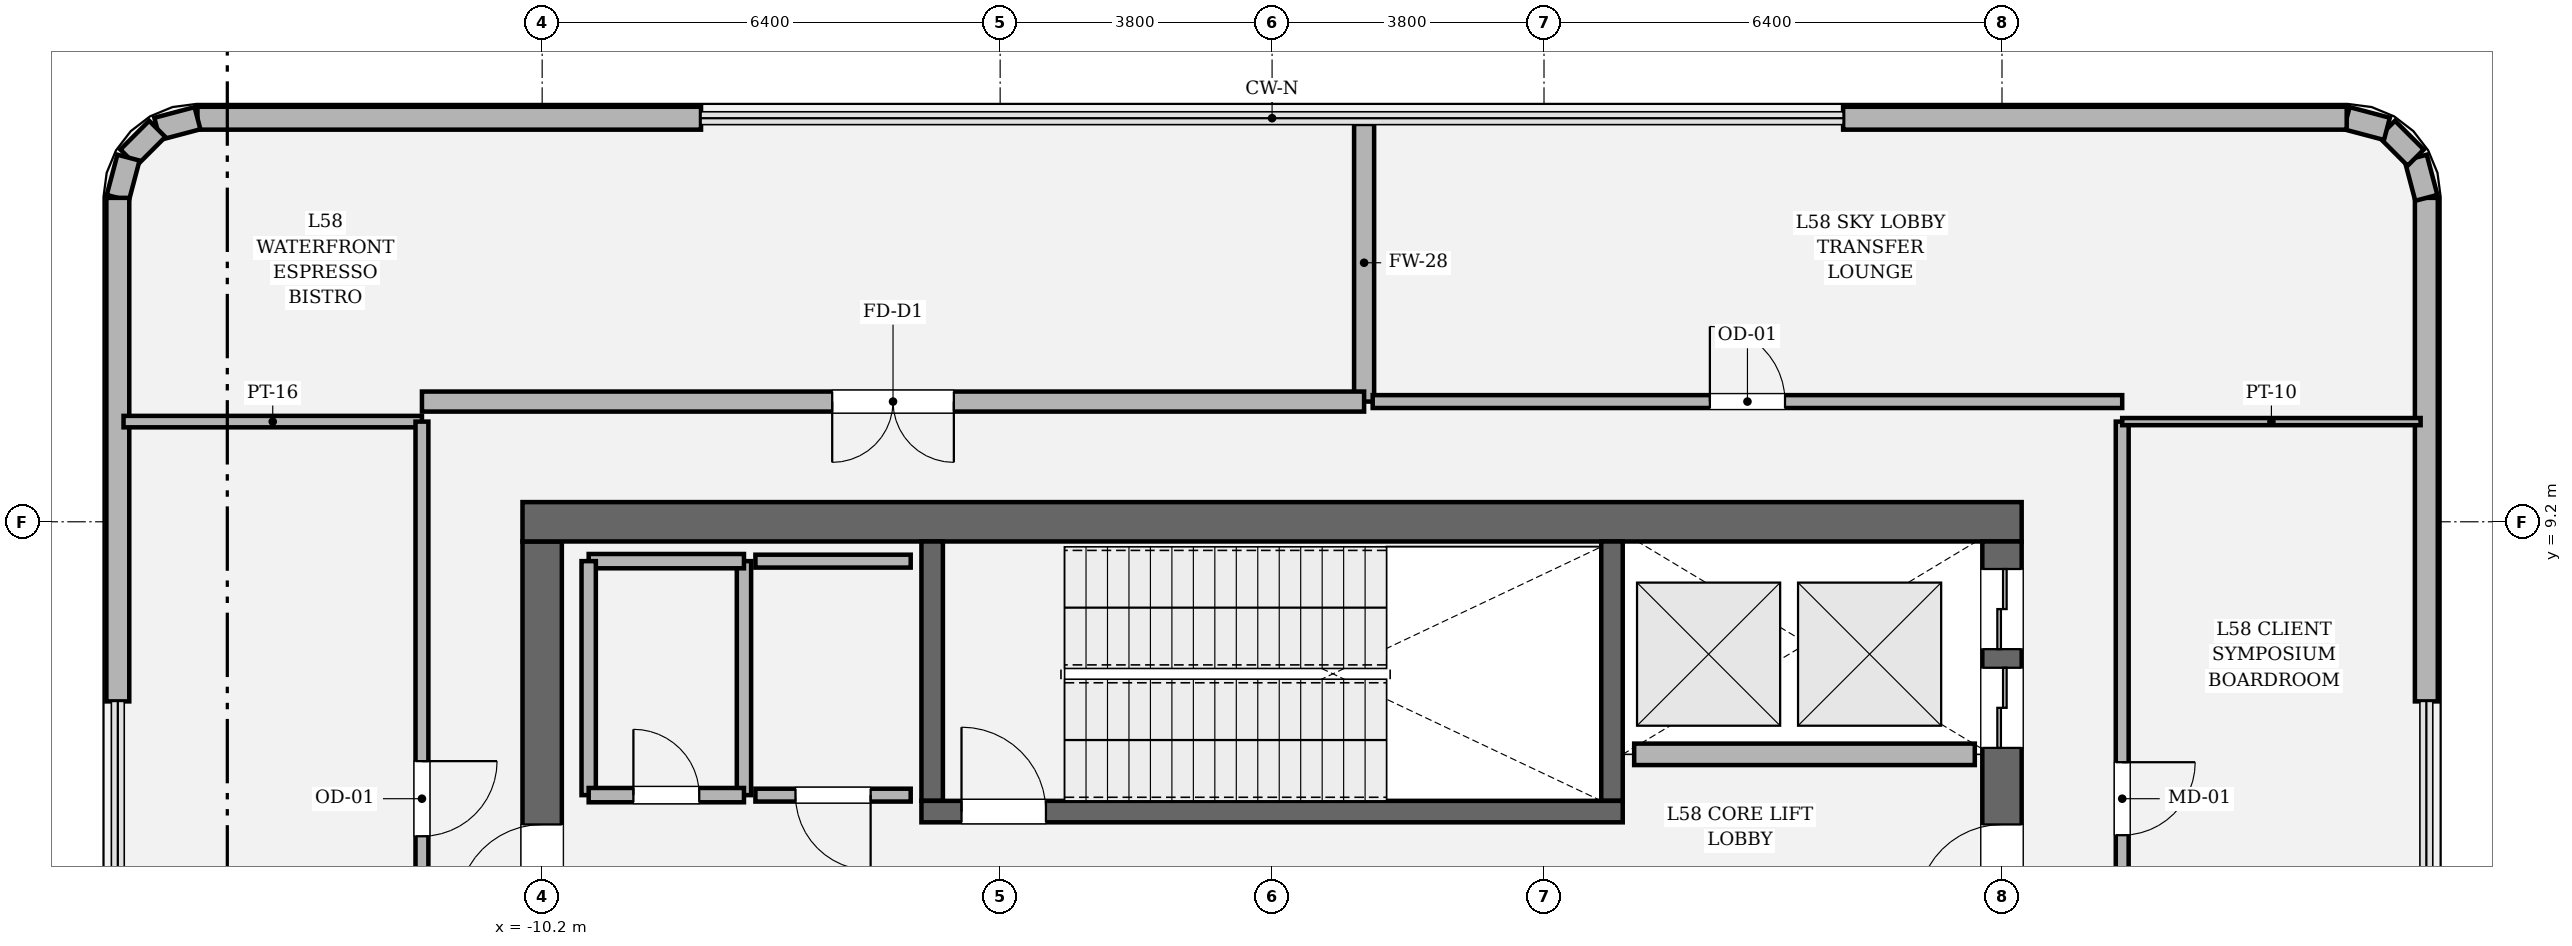
"""IFC4 building model, lengths in metres.
Left out: names, types, materials, properties, quantities, classifications, styles, units other than length and angle.
Written with IfcOpenShell. Run it as: python <this file> out.ifc"""

import sys

from ifc_helpers import new_model, si_unit, direction, frame, frame_2d, origin, place, context, subcontext, project, spatial, rectangle, extrude, element, fill, save


model = new_model("IFC4")
c1 = context("Model", 3, precision=1e-05, world=origin(), true_north=direction((0.0, 1.0)))
c2 = subcontext(c1, "Body", "Model", "MODEL_VIEW")
j1 = project(units=[si_unit("LENGTHUNIT", "METRE"), si_unit("PLANEANGLEUNIT", "RADIAN")], contexts=[c1])
p1 = place(None, origin())
s1 = spatial("IfcSite", under=j1, at=p1, CompositionType="ELEMENT")
p2 = place(p1, origin())
s2 = spatial("IfcBuilding", under=s1, at=p2, CompositionType="ELEMENT")
p3 = place(p2, frame((0.0, 0.0, 246.6)))
s3 = spatial("IfcBuildingStorey", under=s2, at=p3, CompositionType="ELEMENT", Elevation=246.6)
p4 = place(p3, frame((-10.2, -8.925, 0.0), z_axis=(0.0, 0.0, 1.0), x_axis=(0.0, 1.0, 0.0)))
e1 = element("IfcWall", 1, at=p4, inside=s3, PredefinedType="SHEAR", context=c2, shape_type="SweptSolid", body=[
    extrude(rectangle(XDim=17.85, YDim=0.55, at=frame_2d((8.925, 0.0))), origin(), (0.0, 0.0, 1.0), 4.8),
])
p5 = place(p4, frame((12.715, 0.0, 0.0)))
e2 = element("IfcOpeningElement", 2, at=p5, cuts=e1, PredefinedType="OPENING", context=c2, shape_type="SweptSolid", body=[
    extrude(rectangle(XDim=1.18, YDim=2.2, at=frame_2d((0.59, 1.1))), frame((0.0, 0.285, 0.0), z_axis=(0.0, -1.0, 0.0), x_axis=(1.0, 0.0, 0.0)), (0.0, 0.0, 1.0), 0.57),
])
p6 = place(p3, frame((-10.475, 9.2, 0.0), z_axis=(0.0, 0.0, 1.0), x_axis=(1.0, 0.0, 0.0)))
e3 = element("IfcWall", 3, at=p6, inside=s3, PredefinedType="SHEAR", context=c2, shape_type="SweptSolid", body=[
    extrude(rectangle(XDim=20.95, YDim=0.55, at=frame_2d((10.475, 0.0))), origin(), (0.0, 0.0, 1.0), 4.8),
])
p7 = place(p3, frame((10.2, 8.925, 0.0), z_axis=(0.0, 0.0, 1.0), x_axis=(0.0, -1.0, 0.0)))
e4 = element("IfcWall", 4, at=p7, inside=s3, PredefinedType="SHEAR", context=c2, shape_type="SweptSolid", body=[
    extrude(rectangle(XDim=17.85, YDim=0.55, at=frame_2d((8.925, 0.0))), origin(), (0.0, 0.0, 1.0), 4.8),
])
p8 = place(p7, frame((3.955, 0.0, 0.0)))
e5 = element("IfcOpeningElement", 5, at=p8, cuts=e4, PredefinedType="OPENING", context=c2, shape_type="SweptSolid", body=[
    extrude(rectangle(XDim=1.18, YDim=2.2, at=frame_2d((0.59, 1.1))), frame((0.0, 0.285, 0.0), z_axis=(0.0, -1.0, 0.0), x_axis=(1.0, 0.0, 0.0)), (0.0, 0.0, 1.0), 0.57),
])
p9 = place(p7, frame((1.765, 0.0, 0.0)))
e6 = element("IfcOpeningElement", 6, at=p9, cuts=e4, PredefinedType="OPENING", context=c2, shape_type="SweptSolid", body=[
    extrude(rectangle(XDim=1.12, YDim=2.25, at=frame_2d((0.56, 1.125))), frame((0.0, 0.285, 0.0), z_axis=(0.0, -1.0, 0.0), x_axis=(1.0, 0.0, 0.0)), (0.0, 0.0, 1.0), 0.57),
])
p10 = place(p7, frame((0.385, 0.0, 0.0)))
e7 = element("IfcOpeningElement", 7, at=p10, cuts=e4, PredefinedType="OPENING", context=c2, shape_type="SweptSolid", body=[
    extrude(rectangle(XDim=1.12, YDim=2.25, at=frame_2d((0.56, 1.125))), frame((0.0, 0.285, 0.0), z_axis=(0.0, -1.0, 0.0), x_axis=(1.0, 0.0, 0.0)), (0.0, 0.0, 1.0), 0.57),
])
for number, where, z_axis, x_axis in (
    (8, (-4.75, 5.3, 0.0), (0.0, 0.0, 1.0), (0.0, 1.0, 0.0)),
    (9, (4.75, 8.925, 0.0), (0.0, 0.0, 1.0), (0.0, -1.0, 0.0)),
):
    element("IfcWall", number, at=place(p3, frame(where, z_axis=z_axis, x_axis=x_axis)), inside=s3, PredefinedType="SOLIDWALL", context=c2, shape_type="SweptSolid", body=[
        extrude(rectangle(XDim=3.625, YDim=0.3, at=frame_2d((1.812, 0.0))), origin(), (0.0, 0.0, 1.0), 4.8),
    ])
p11 = place(p3, frame((-4.9, 5.15, 0.0), z_axis=(0.0, 0.0, 1.0), x_axis=(1.0, 0.0, 0.0)))
e10 = element("IfcWall", 10, at=p11, inside=s3, PredefinedType="SOLIDWALL", context=c2, shape_type="SweptSolid", body=[
    extrude(rectangle(XDim=9.8, YDim=0.3, at=frame_2d((4.9, 0.0))), origin(), (0.0, 0.0, 1.0), 4.8),
])
p12 = place(p11, frame((0.56, 0.0, 0.0)))
e11 = element("IfcOpeningElement", 11, at=p12, cuts=e10, PredefinedType="OPENING", context=c2, shape_type="SweptSolid", body=[
    extrude(rectangle(XDim=1.18, YDim=2.2, at=frame_2d((0.59, 1.1))), frame((0.0, 0.16, 0.0), z_axis=(0.0, -1.0, 0.0), x_axis=(1.0, 0.0, 0.0)), (0.0, 0.0, 1.0), 0.32),
])
p13 = place(p3, frame((16.13, 6.69, 0.0), z_axis=(0.0, 0.0, 1.0), x_axis=(0.0, 1.0, 0.0)))
e12 = element("IfcWall", 12, at=p13, inside=s3, PredefinedType="SOLIDWALL", context=c2, shape_type="SweptSolid", body=[
    extrude(rectangle(XDim=7.037, YDim=0.32, at=frame_2d((3.519, 0.0))), origin(), (0.0, 0.0, 1.0), 3.194),
])
p14 = place(p3, frame((16.13, 13.727, 0.0), z_axis=(0.0, 0.0, 1.0), x_axis=(-0.255650250031, 0.966769336325, 0.0)))
e13 = element("IfcWall", 13, at=p14, inside=s3, PredefinedType="SOLIDWALL", context=c2, shape_type="SweptSolid", body=[
    extrude(rectangle(XDim=0.582, YDim=0.32, at=frame_2d((0.291, 0.0))), origin(), (0.0, 0.0, 1.0), 4.52),
])
p15 = place(p3, frame((15.981, 14.289, 0.0), z_axis=(0.0, 0.0, 1.0), x_axis=(-0.707106781187, 0.707106781187, 0.0)))
e14 = element("IfcWall", 14, at=p15, inside=s3, PredefinedType="SOLIDWALL", context=c2, shape_type="SweptSolid", body=[
    extrude(rectangle(XDim=0.569, YDim=0.32, at=frame_2d((0.284, 0.0))), origin(), (0.0, 0.0, 1.0), 4.52),
])
p16 = place(p3, frame((15.579, 14.691, 0.0), z_axis=(0.0, 0.0, 1.0), x_axis=(-0.966665515501, 0.256042537758, 0.0)))
e15 = element("IfcWall", 15, at=p16, inside=s3, PredefinedType="SOLIDWALL", context=c2, shape_type="SweptSolid", body=[
    extrude(rectangle(XDim=0.582, YDim=0.32, at=frame_2d((0.291, 0.0))), origin(), (0.0, 0.0, 1.0), 4.52),
])
for number, where, z_axis, x_axis in (
    (16, (15.017, 14.84, 0.0), (0.0, 0.0, 1.0), (-1.0, 0.0, 0.0)),
    (17, (-7.98, 14.84, 0.0), (0.0, 0.0, 1.0), (-1.0, 0.0, 0.0)),
):
    element("IfcWall", number, at=place(p3, frame(where, z_axis=z_axis, x_axis=x_axis)), inside=s3, PredefinedType="SOLIDWALL", context=c2, shape_type="SweptSolid", body=[
        extrude(rectangle(XDim=7.037, YDim=0.32, at=frame_2d((3.519, 0.0))), origin(), (0.0, 0.0, 1.0), 3.194),
    ])
p17 = place(p3, frame((-15.017, 14.84, 0.0), z_axis=(0.0, 0.0, 1.0), x_axis=(-0.966665515501, -0.256042537758, 0.0)))
e18 = element("IfcWall", 18, at=p17, inside=s3, PredefinedType="SOLIDWALL", context=c2, shape_type="SweptSolid", body=[
    extrude(rectangle(XDim=0.582, YDim=0.32, at=frame_2d((0.291, 0.0))), origin(), (0.0, 0.0, 1.0), 4.52),
])
p18 = place(p3, frame((-15.579, 14.691, 0.0), z_axis=(0.0, 0.0, 1.0), x_axis=(-0.707106781187, -0.707106781187, 0.0)))
e19 = element("IfcWall", 19, at=p18, inside=s3, PredefinedType="SOLIDWALL", context=c2, shape_type="SweptSolid", body=[
    extrude(rectangle(XDim=0.569, YDim=0.32, at=frame_2d((0.284, 0.0))), origin(), (0.0, 0.0, 1.0), 4.52),
])
p19 = place(p3, frame((-15.981, 14.289, 0.0), z_axis=(0.0, 0.0, 1.0), x_axis=(-0.255650250031, -0.966769336325, 0.0)))
e20 = element("IfcWall", 20, at=p19, inside=s3, PredefinedType="SOLIDWALL", context=c2, shape_type="SweptSolid", body=[
    extrude(rectangle(XDim=0.582, YDim=0.32, at=frame_2d((0.291, 0.0))), origin(), (0.0, 0.0, 1.0), 4.52),
])
p20 = place(p3, frame((-16.13, 13.727, 0.0), z_axis=(0.0, 0.0, 1.0), x_axis=(0.0, -1.0, 0.0)))
e21 = element("IfcWall", 21, at=p20, inside=s3, PredefinedType="SOLIDWALL", context=c2, shape_type="SweptSolid", body=[
    extrude(rectangle(XDim=7.037, YDim=0.32, at=frame_2d((3.519, 0.0))), origin(), (0.0, 0.0, 1.0), 3.194),
])
p21 = place(p3, frame((5.06, 5.95, 0.0), z_axis=(0.0, 0.0, 1.0), x_axis=(1.0, 0.0, 0.0)))
e22 = element("IfcWall", 22, at=p21, inside=s3, PredefinedType="SOLIDWALL", context=c2, shape_type="SweptSolid", body=[
    extrude(rectangle(XDim=4.76, YDim=0.3, at=frame_2d((2.38, 0.0))), origin(), (0.0, 0.0, 1.0), 4.52),
])
p22 = place(p3, frame((-7.38, 5.38, 0.0), z_axis=(0.0, 0.0, 1.0), x_axis=(0.0, 1.0, 0.0)))
e23 = element("IfcWall", 23, at=p22, inside=s3, PredefinedType="SOLIDWALL", context=c2, shape_type="SweptSolid", body=[
    extrude(rectangle(XDim=3.27, YDim=0.2, at=frame_2d((1.635, 0.0))), origin(), (0.0, 0.0, 1.0), 4.52),
])
p23 = place(p3, frame((-7.38, 8.65, 0.0), z_axis=(0.0, 0.0, 1.0), x_axis=(-1.0, 0.0, 0.0)))
e24 = element("IfcWall", 24, at=p23, inside=s3, PredefinedType="SOLIDWALL", context=c2, shape_type="SweptSolid", body=[
    extrude(rectangle(XDim=2.17, YDim=0.2, at=frame_2d((1.085, 0.0))), origin(), (0.0, 0.0, 1.0), 4.52),
])
p24 = place(p3, frame((-9.55, 8.65, 0.0), z_axis=(0.0, 0.0, 1.0), x_axis=(0.0, -1.0, 0.0)))
e25 = element("IfcWall", 25, at=p24, inside=s3, PredefinedType="SOLIDWALL", context=c2, shape_type="SweptSolid", body=[
    extrude(rectangle(XDim=3.27, YDim=0.2, at=frame_2d((1.635, 0.0))), origin(), (0.0, 0.0, 1.0), 4.52),
])
p25 = place(p3, frame((-9.55, 5.38, 0.0), z_axis=(0.0, 0.0, 1.0), x_axis=(1.0, 0.0, 0.0)))
e26 = element("IfcWall", 26, at=p25, inside=s3, PredefinedType="SOLIDWALL", context=c2, shape_type="SweptSolid", body=[
    extrude(rectangle(XDim=2.17, YDim=0.2, at=frame_2d((1.085, 0.0))), origin(), (0.0, 0.0, 1.0), 4.52),
])
p26 = place(p25, frame((0.625, 0.0, 0.0)))
e27 = element("IfcOpeningElement", 27, at=p26, cuts=e26, PredefinedType="OPENING", context=c2, shape_type="SweptSolid", body=[
    extrude(rectangle(XDim=0.92, YDim=2.1, at=frame_2d((0.46, 1.05))), frame((0.0, 0.11, 0.0), z_axis=(0.0, -1.0, 0.0), x_axis=(1.0, 0.0, 0.0)), (0.0, 0.0, 1.0), 0.22),
])
p27 = place(p3, frame((-5.05, 8.65, 0.0), z_axis=(0.0, 0.0, 1.0), x_axis=(-1.0, 0.0, 0.0)))
e28 = element("IfcWall", 28, at=p27, inside=s3, PredefinedType="PARTITIONING", context=c2, shape_type="SweptSolid", body=[
    extrude(rectangle(XDim=2.17, YDim=0.18, at=frame_2d((1.085, 0.0))), origin(), (0.0, 0.0, 1.0), 4.52),
])
p28 = place(p3, frame((-7.22, 5.38, 0.0), z_axis=(0.0, 0.0, 1.0), x_axis=(1.0, 0.0, 0.0)))
e29 = element("IfcWall", 29, at=p28, inside=s3, PredefinedType="PARTITIONING", context=c2, shape_type="SweptSolid", body=[
    extrude(rectangle(XDim=2.17, YDim=0.18, at=frame_2d((1.085, 0.0))), origin(), (0.0, 0.0, 1.0), 4.52),
])
p29 = place(p28, frame((0.56, 0.0, 0.0)))
e30 = element("IfcOpeningElement", 30, at=p29, cuts=e29, PredefinedType="OPENING", context=c2, shape_type="SweptSolid", body=[
    extrude(rectangle(XDim=1.05, YDim=2.2, at=frame_2d((0.525, 1.1))), frame((0.0, 0.1, 0.0), z_axis=(0.0, -1.0, 0.0), x_axis=(1.0, 0.0, 0.0)), (0.0, 0.0, 1.0), 0.2),
])
p30 = place(p3, frame((-16.05, 10.6, 0.0), z_axis=(0.0, 0.0, 1.0), x_axis=(1.0, 0.0, 0.0)))
e31 = element("IfcWall", 31, at=p30, inside=s3, PredefinedType="PARTITIONING", context=c2, shape_type="SweptSolid", body=[
    extrude(rectangle(XDim=4.17, YDim=0.16, at=frame_2d((2.085, 0.0))), origin(), (0.0, 0.0, 1.0), 4.154),
])
p31 = place(p3, frame((-11.88, 10.6, 0.0), z_axis=(0.0, 0.0, 1.0), x_axis=(0.0, -1.0, 0.0)))
e32 = element("IfcWall", 32, at=p31, inside=s3, PredefinedType="PARTITIONING", context=c2, shape_type="SweptSolid", body=[
    extrude(rectangle(XDim=10.54, YDim=0.18, at=frame_2d((5.27, 0.0))), origin(), (0.0, 0.0, 1.0), 3.194),
])
p32 = place(p31, frame((4.745, 0.0, 0.0)))
e33 = element("IfcOpeningElement", 33, at=p32, cuts=e32, PredefinedType="OPENING", context=c2, shape_type="SweptSolid", body=[
    extrude(rectangle(XDim=1.05, YDim=2.2, at=frame_2d((0.525, 1.1))), frame((0.0, 0.1, 0.0), z_axis=(0.0, -1.0, 0.0), x_axis=(1.0, 0.0, 0.0)), (0.0, 0.0, 1.0), 0.2),
])
p33 = place(p3, frame((11.88, 0.06, 0.0), z_axis=(0.0, 0.0, 1.0), x_axis=(0.0, 1.0, 0.0)))
e34 = element("IfcWall", 34, at=p33, inside=s3, PredefinedType="PARTITIONING", context=c2, shape_type="SweptSolid", body=[
    extrude(rectangle(XDim=10.54, YDim=0.18, at=frame_2d((5.27, 0.0))), origin(), (0.0, 0.0, 1.0), 3.194),
])
p34 = place(p33, frame((4.76, 0.0, 0.0)))
e35 = element("IfcOpeningElement", 35, at=p34, cuts=e34, PredefinedType="OPENING", context=c2, shape_type="SweptSolid", body=[
    extrude(rectangle(XDim=1.02, YDim=2.2, at=frame_2d((0.51, 1.1))), frame((0.0, 0.1, 0.0), z_axis=(0.0, -1.0, 0.0), x_axis=(1.0, 0.0, 0.0)), (0.0, 0.0, 1.0), 0.2),
])
p35 = place(p3, frame((11.88, 10.6, 0.0), z_axis=(0.0, 0.0, 1.0), x_axis=(1.0, 0.0, 0.0)))
e36 = element("IfcWall", 36, at=p35, inside=s3, PredefinedType="PARTITIONING", context=c2, shape_type="SweptSolid", body=[
    extrude(rectangle(XDim=4.17, YDim=0.1, at=frame_2d((2.085, 0.0))), origin(), (0.0, 0.0, 1.0), 4.154),
])
p36 = place(p3, frame((1.286, 14.76, 0.0), z_axis=(0.0, 0.0, 1.0), x_axis=(0.0, -1.0, 0.0)))
e37 = element("IfcWall", 37, at=p36, inside=s3, PredefinedType="SOLIDWALL", context=c2, shape_type="SweptSolid", body=[
    extrude(rectangle(XDim=3.88, YDim=0.28, at=frame_2d((1.94, 0.0))), origin(), (0.0, 0.0, 1.0), 4.52),
])
p37 = place(p3, frame((1.286, 10.88, 0.0), z_axis=(0.0, 0.0, 1.0), x_axis=(-1.0, 0.0, 0.0)))
e38 = element("IfcWall", 38, at=p37, inside=s3, PredefinedType="SOLIDWALL", context=c2, shape_type="SweptSolid", body=[
    extrude(rectangle(XDim=13.166, YDim=0.28, at=frame_2d((6.583, 0.0))), origin(), (0.0, 0.0, 1.0), 3.194),
])
p38 = place(p37, frame((5.733, 0.0, 0.0)))
e39 = element("IfcOpeningElement", 39, at=p38, cuts=e38, PredefinedType="OPENING", context=c2, shape_type="SweptSolid", body=[
    extrude(rectangle(XDim=1.7, YDim=2.3, at=frame_2d((0.85, 1.15))), frame((0.0, 0.15, 0.0), z_axis=(0.0, -1.0, 0.0), x_axis=(1.0, 0.0, 0.0)), (0.0, 0.0, 1.0), 0.3),
])
p39 = place(p3, frame((11.88, 10.88, 0.0), z_axis=(0.0, 0.0, 1.0), x_axis=(-1.0, 0.0, 0.0)))
e40 = element("IfcWall", 40, at=p39, inside=s3, PredefinedType="PARTITIONING", context=c2, shape_type="SweptSolid", body=[
    extrude(rectangle(XDim=10.474, YDim=0.18, at=frame_2d((5.237, 0.0))), origin(), (0.0, 0.0, 1.0), 3.194),
])
p40 = place(p39, frame((4.712, 0.0, 0.0)))
e41 = element("IfcOpeningElement", 41, at=p40, cuts=e40, PredefinedType="OPENING", context=c2, shape_type="SweptSolid", body=[
    extrude(rectangle(XDim=1.05, YDim=2.2, at=frame_2d((0.525, 1.1))), frame((0.0, 0.1, 0.0), z_axis=(0.0, -1.0, 0.0), x_axis=(1.0, 0.0, 0.0)), (0.0, 0.0, 1.0), 0.2),
])
p41 = place(p12, origin())
e42 = element("IfcDoor", 42, at=p41, inside=s3, OperationType="SINGLE_SWING_LEFT", PredefinedType="DOOR", context=c2, shape_type="SweptSolid", body=[
    extrude(rectangle(XDim=1.18, YDim=2.2, at=frame_2d((0.59, 1.1))), frame((0.0, 0.025, 0.0), z_axis=(0.0, -1.0, 0.0), x_axis=(1.0, 0.0, 0.0)), (0.0, 0.0, 1.0), 0.05),
])
fill(e11, e42)
p42 = place(p5, origin())
e43 = element("IfcDoor", 43, at=p42, inside=s3, OperationType="SINGLE_SWING_LEFT", PredefinedType="DOOR", context=c2, shape_type="SweptSolid", body=[
    extrude(rectangle(XDim=1.18, YDim=2.2, at=frame_2d((0.59, 1.1))), frame((0.0, 0.025, 0.0), z_axis=(0.0, -1.0, 0.0), x_axis=(1.0, 0.0, 0.0)), (0.0, 0.0, 1.0), 0.05),
])
fill(e2, e43)
p43 = place(p8, origin())
e44 = element("IfcDoor", 44, at=p43, inside=s3, OperationType="SINGLE_SWING_RIGHT", PredefinedType="DOOR", context=c2, shape_type="SweptSolid", body=[
    extrude(rectangle(XDim=1.18, YDim=2.2, at=frame_2d((0.59, 1.1))), frame((0.0, 0.025, 0.0), z_axis=(0.0, -1.0, 0.0), x_axis=(1.0, 0.0, 0.0)), (0.0, 0.0, 1.0), 0.05),
])
fill(e5, e44)
p44 = place(p9, origin())
e45 = element("IfcDoor", 45, at=p44, inside=s3, OperationType="DOUBLE_DOOR_SLIDING", PredefinedType="DOOR", context=c2, shape_type="SweptSolid", body=[
    extrude(rectangle(XDim=1.12, YDim=2.25, at=frame_2d((0.56, 1.125))), frame((0.0, 0.025, 0.0), z_axis=(0.0, -1.0, 0.0), x_axis=(1.0, 0.0, 0.0)), (0.0, 0.0, 1.0), 0.05),
])
fill(e6, e45)
p45 = place(p10, origin())
e46 = element("IfcDoor", 46, at=p45, inside=s3, OperationType="DOUBLE_DOOR_SLIDING", PredefinedType="DOOR", context=c2, shape_type="SweptSolid", body=[
    extrude(rectangle(XDim=1.12, YDim=2.25, at=frame_2d((0.56, 1.125))), frame((0.0, 0.025, 0.0), z_axis=(0.0, -1.0, 0.0), x_axis=(1.0, 0.0, 0.0)), (0.0, 0.0, 1.0), 0.05),
])
fill(e7, e46)
p46 = place(p26, origin())
e47 = element("IfcDoor", 47, at=p46, inside=s3, OperationType="SINGLE_SWING_LEFT", PredefinedType="DOOR", context=c2, shape_type="SweptSolid", body=[
    extrude(rectangle(XDim=0.92, YDim=2.1, at=frame_2d((0.46, 1.05))), frame((0.0, 0.025, 0.0), z_axis=(0.0, -1.0, 0.0), x_axis=(1.0, 0.0, 0.0)), (0.0, 0.0, 1.0), 0.05),
])
fill(e27, e47)
p47 = place(p29, origin())
e48 = element("IfcDoor", 48, at=p47, inside=s3, OperationType="SINGLE_SWING_RIGHT", PredefinedType="DOOR", context=c2, shape_type="SweptSolid", body=[
    extrude(rectangle(XDim=1.05, YDim=2.2, at=frame_2d((0.525, 1.1))), frame((0.0, 0.025, 0.0), z_axis=(0.0, -1.0, 0.0), x_axis=(1.0, 0.0, 0.0)), (0.0, 0.0, 1.0), 0.05),
])
fill(e30, e48)
p48 = place(p32, origin())
e49 = element("IfcDoor", 49, at=p48, inside=s3, OperationType="SINGLE_SWING_LEFT", PredefinedType="DOOR", context=c2, shape_type="SweptSolid", body=[
    extrude(rectangle(XDim=1.05, YDim=2.2, at=frame_2d((0.525, 1.1))), frame((0.0, 0.025, 0.0), z_axis=(0.0, -1.0, 0.0), x_axis=(1.0, 0.0, 0.0)), (0.0, 0.0, 1.0), 0.05),
])
fill(e33, e49)
p49 = place(p34, origin())
e50 = element("IfcDoor", 50, at=p49, inside=s3, OperationType="SINGLE_SWING_RIGHT", PredefinedType="DOOR", context=c2, shape_type="SweptSolid", body=[
    extrude(rectangle(XDim=1.02, YDim=2.2, at=frame_2d((0.51, 1.1))), frame((0.0, 0.025, 0.0), z_axis=(0.0, -1.0, 0.0), x_axis=(1.0, 0.0, 0.0)), (0.0, 0.0, 1.0), 0.05),
])
fill(e35, e50)
p50 = place(p38, origin())
e51 = element("IfcDoor", 51, at=p50, inside=s3, OperationType="DOUBLE_DOOR_SINGLE_SWING", PredefinedType="DOOR", context=c2, shape_type="SweptSolid", body=[
    extrude(rectangle(XDim=1.7, YDim=2.3, at=frame_2d((0.85, 1.15))), frame((0.0, 0.025, 0.0), z_axis=(0.0, -1.0, 0.0), x_axis=(1.0, 0.0, 0.0)), (0.0, 0.0, 1.0), 0.05),
])
fill(e39, e51)
p51 = place(p40, origin())
e52 = element("IfcDoor", 52, at=p51, inside=s3, OperationType="SINGLE_SWING_RIGHT", PredefinedType="DOOR", context=c2, shape_type="SweptSolid", body=[
    extrude(rectangle(XDim=1.05, YDim=2.2, at=frame_2d((0.525, 1.1))), frame((0.0, 0.025, 0.0), z_axis=(0.0, -1.0, 0.0), x_axis=(1.0, 0.0, 0.0)), (0.0, 0.0, 1.0), 0.05),
])
fill(e41, e52)
save(model, sys.argv[1])
